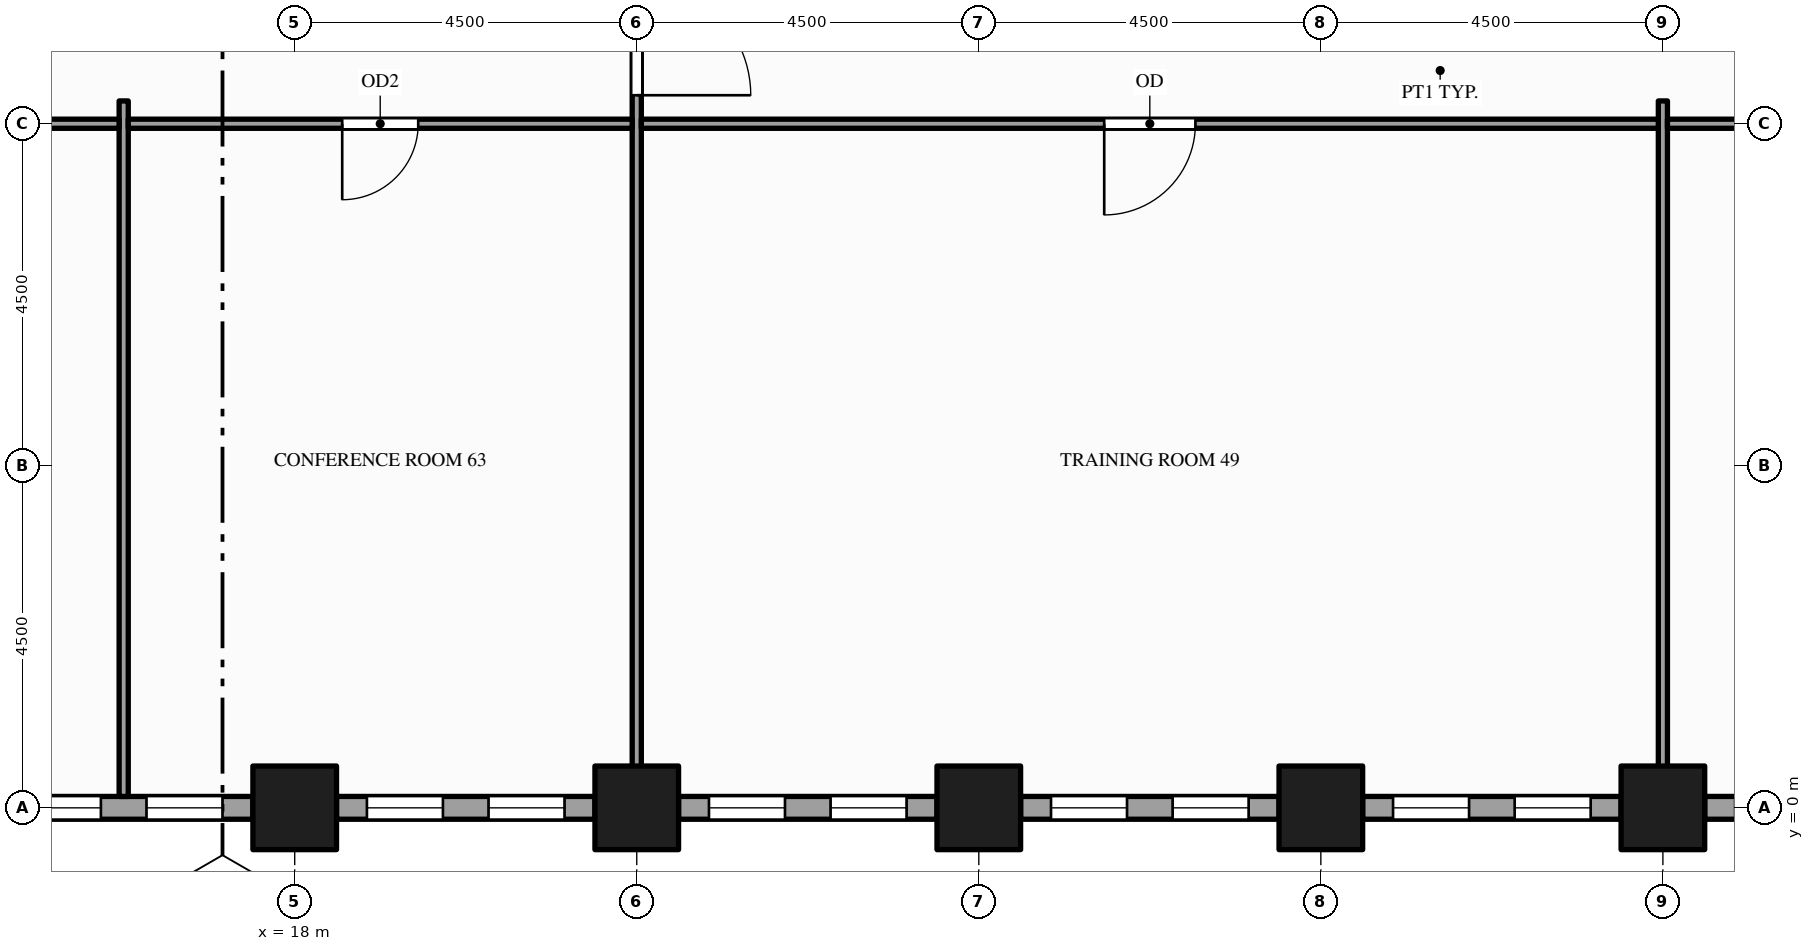
"""IFC4 building model, lengths in metres.
Left out: names, types, materials, properties, quantities, classifications, styles, units other than length and angle.
Written with IfcOpenShell. Run it as: python <this file> out.ifc"""

import sys

from ifc_helpers import new_model, si_unit, direction, frame, frame_2d, origin, origin_2d, place, context, subcontext, project, spatial, rectangle, hollow_rectangle, extrude, element, fill, save


model = new_model("IFC4")
c1 = context("Model", 3, precision=1e-05, world=origin(), true_north=direction((0.0, 1.0)))
c2 = subcontext(c1, "Body", "Model", "MODEL_VIEW")
j1 = project(units=[si_unit("LENGTHUNIT", "METRE"), si_unit("PLANEANGLEUNIT", "RADIAN")], contexts=[c1])
p1 = place(None, origin())
s1 = spatial("IfcSite", under=j1, at=p1, CompositionType="ELEMENT")
p2 = place(p1, origin())
s2 = spatial("IfcBuilding", under=s1, at=p2, CompositionType="ELEMENT")
p3 = place(p2, frame((0.0, 0.0, 19.0)))
s3 = spatial("IfcBuildingStorey", under=s2, at=p3, CompositionType="ELEMENT", Elevation=19.0)
for number, where, z_axis, x_axis in (
    (1, (18.0, 0.0, -0.25), (0.0, 0.0, 1.0), (1.0, 0.0, 0.0)),
    (2, (22.5, 0.0, -0.25), (0.0, 0.0, 1.0), (1.0, 0.0, 0.0)),
    (3, (27.0, 0.0, -0.25), (0.0, 0.0, 1.0), (1.0, 0.0, 0.0)),
    (4, (31.5, 0.0, -0.25), (0.0, 0.0, 1.0), (1.0, 0.0, 0.0)),
    (5, (36.0, 0.0, -0.25), (0.0, 0.0, 1.0), (1.0, 0.0, 0.0)),
):
    element("IfcColumn", number, at=place(p3, frame(where, z_axis=z_axis, x_axis=x_axis)), inside=s3, PredefinedType="COLUMN", context=c2, shape_type="SweptSolid", body=[
        extrude(hollow_rectangle(XDim=1.1, YDim=1.1, WallThickness=0.06, at=origin_2d()), origin(), (0.0, 0.0, 1.0), 5.0),
    ])
p4 = place(p3, frame((14.05, 0.0, 0.0), z_axis=(0.0, 0.0, 1.0), x_axis=(1.0, 0.0, 0.0)))
e6 = element("IfcWall", 6, at=p4, inside=s3, PredefinedType="STANDARD", context=c2, shape_type="SweptSolid", body=[
    extrude(rectangle(XDim=3.4, YDim=0.3, at=frame_2d((1.7, 0.0))), origin(), (0.0, 0.0, 1.0), 4.036),
])
p5 = place(p4, frame((0.4, 0.0, 0.9)))
e7 = element("IfcOpeningElement", 7, at=p5, cuts=e6, PredefinedType="OPENING", context=c2, shape_type="SweptSolid", body=[
    extrude(rectangle(XDim=1.0, YDim=2.75, at=frame_2d((0.5, 1.375))), frame((0.0, 0.16, 0.0), z_axis=(0.0, -1.0, 0.0), x_axis=(1.0, 0.0, 0.0)), (0.0, 0.0, 1.0), 0.32),
])
p6 = place(p4, frame((2.0, 0.0, 0.9)))
e8 = element("IfcOpeningElement", 8, at=p6, cuts=e6, PredefinedType="OPENING", context=c2, shape_type="SweptSolid", body=[
    extrude(rectangle(XDim=1.0, YDim=2.75, at=frame_2d((0.5, 1.375))), frame((0.0, 0.16, 0.0), z_axis=(0.0, -1.0, 0.0), x_axis=(1.0, 0.0, 0.0)), (0.0, 0.0, 1.0), 0.32),
])
p7 = place(p3, frame((18.55, 0.0, 0.0), z_axis=(0.0, 0.0, 1.0), x_axis=(1.0, 0.0, 0.0)))
e9 = element("IfcWall", 9, at=p7, inside=s3, PredefinedType="STANDARD", context=c2, shape_type="SweptSolid", body=[
    extrude(rectangle(XDim=3.4, YDim=0.3, at=frame_2d((1.7, 0.0))), origin(), (0.0, 0.0, 1.0), 4.036),
])
p8 = place(p7, frame((0.4, 0.0, 0.9)))
e10 = element("IfcOpeningElement", 10, at=p8, cuts=e9, PredefinedType="OPENING", context=c2, shape_type="SweptSolid", body=[
    extrude(rectangle(XDim=1.0, YDim=2.75, at=frame_2d((0.5, 1.375))), frame((0.0, 0.16, 0.0), z_axis=(0.0, -1.0, 0.0), x_axis=(1.0, 0.0, 0.0)), (0.0, 0.0, 1.0), 0.32),
])
p9 = place(p7, frame((2.0, 0.0, 0.9)))
e11 = element("IfcOpeningElement", 11, at=p9, cuts=e9, PredefinedType="OPENING", context=c2, shape_type="SweptSolid", body=[
    extrude(rectangle(XDim=1.0, YDim=2.75, at=frame_2d((0.5, 1.375))), frame((0.0, 0.16, 0.0), z_axis=(0.0, -1.0, 0.0), x_axis=(1.0, 0.0, 0.0)), (0.0, 0.0, 1.0), 0.32),
])
p10 = place(p3, frame((23.05, 0.0, 0.0), z_axis=(0.0, 0.0, 1.0), x_axis=(1.0, 0.0, 0.0)))
e12 = element("IfcWall", 12, at=p10, inside=s3, PredefinedType="STANDARD", context=c2, shape_type="SweptSolid", body=[
    extrude(rectangle(XDim=3.4, YDim=0.3, at=frame_2d((1.7, 0.0))), origin(), (0.0, 0.0, 1.0), 4.036),
])
p11 = place(p10, frame((0.4, 0.0, 0.9)))
e13 = element("IfcOpeningElement", 13, at=p11, cuts=e12, PredefinedType="OPENING", context=c2, shape_type="SweptSolid", body=[
    extrude(rectangle(XDim=1.0, YDim=2.75, at=frame_2d((0.5, 1.375))), frame((0.0, 0.16, 0.0), z_axis=(0.0, -1.0, 0.0), x_axis=(1.0, 0.0, 0.0)), (0.0, 0.0, 1.0), 0.32),
])
p12 = place(p10, frame((2.0, 0.0, 0.9)))
e14 = element("IfcOpeningElement", 14, at=p12, cuts=e12, PredefinedType="OPENING", context=c2, shape_type="SweptSolid", body=[
    extrude(rectangle(XDim=1.0, YDim=2.75, at=frame_2d((0.5, 1.375))), frame((0.0, 0.16, 0.0), z_axis=(0.0, -1.0, 0.0), x_axis=(1.0, 0.0, 0.0)), (0.0, 0.0, 1.0), 0.32),
])
p13 = place(p3, frame((27.55, 0.0, 0.0), z_axis=(0.0, 0.0, 1.0), x_axis=(1.0, 0.0, 0.0)))
e15 = element("IfcWall", 15, at=p13, inside=s3, PredefinedType="STANDARD", context=c2, shape_type="SweptSolid", body=[
    extrude(rectangle(XDim=3.4, YDim=0.3, at=frame_2d((1.7, 0.0))), origin(), (0.0, 0.0, 1.0), 4.036),
])
p14 = place(p13, frame((0.4, 0.0, 0.9)))
e16 = element("IfcOpeningElement", 16, at=p14, cuts=e15, PredefinedType="OPENING", context=c2, shape_type="SweptSolid", body=[
    extrude(rectangle(XDim=1.0, YDim=2.75, at=frame_2d((0.5, 1.375))), frame((0.0, 0.16, 0.0), z_axis=(0.0, -1.0, 0.0), x_axis=(1.0, 0.0, 0.0)), (0.0, 0.0, 1.0), 0.32),
])
p15 = place(p13, frame((2.0, 0.0, 0.9)))
e17 = element("IfcOpeningElement", 17, at=p15, cuts=e15, PredefinedType="OPENING", context=c2, shape_type="SweptSolid", body=[
    extrude(rectangle(XDim=1.0, YDim=2.75, at=frame_2d((0.5, 1.375))), frame((0.0, 0.16, 0.0), z_axis=(0.0, -1.0, 0.0), x_axis=(1.0, 0.0, 0.0)), (0.0, 0.0, 1.0), 0.32),
])
p16 = place(p3, frame((32.05, 0.0, 0.0), z_axis=(0.0, 0.0, 1.0), x_axis=(1.0, 0.0, 0.0)))
e18 = element("IfcWall", 18, at=p16, inside=s3, PredefinedType="STANDARD", context=c2, shape_type="SweptSolid", body=[
    extrude(rectangle(XDim=3.4, YDim=0.3, at=frame_2d((1.7, 0.0))), origin(), (0.0, 0.0, 1.0), 4.036),
])
p17 = place(p16, frame((0.4, 0.0, 0.9)))
e19 = element("IfcOpeningElement", 19, at=p17, cuts=e18, PredefinedType="OPENING", context=c2, shape_type="SweptSolid", body=[
    extrude(rectangle(XDim=1.0, YDim=2.75, at=frame_2d((0.5, 1.375))), frame((0.0, 0.16, 0.0), z_axis=(0.0, -1.0, 0.0), x_axis=(1.0, 0.0, 0.0)), (0.0, 0.0, 1.0), 0.32),
])
p18 = place(p16, frame((2.0, 0.0, 0.9)))
e20 = element("IfcOpeningElement", 20, at=p18, cuts=e18, PredefinedType="OPENING", context=c2, shape_type="SweptSolid", body=[
    extrude(rectangle(XDim=1.0, YDim=2.75, at=frame_2d((0.5, 1.375))), frame((0.0, 0.16, 0.0), z_axis=(0.0, -1.0, 0.0), x_axis=(1.0, 0.0, 0.0)), (0.0, 0.0, 1.0), 0.32),
])
p19 = place(p3, frame((36.55, 0.0, 0.0), z_axis=(0.0, 0.0, 1.0), x_axis=(1.0, 0.0, 0.0)))
e21 = element("IfcWall", 21, at=p19, inside=s3, PredefinedType="STANDARD", context=c2, shape_type="SweptSolid", body=[
    extrude(rectangle(XDim=3.4, YDim=0.3, at=frame_2d((1.7, 0.0))), origin(), (0.0, 0.0, 1.0), 4.036),
])
p20 = place(p19, frame((0.4, 0.0, 0.9)))
e22 = element("IfcOpeningElement", 22, at=p20, cuts=e21, PredefinedType="OPENING", context=c2, shape_type="SweptSolid", body=[
    extrude(rectangle(XDim=1.0, YDim=2.75, at=frame_2d((0.5, 1.375))), frame((0.0, 0.16, 0.0), z_axis=(0.0, -1.0, 0.0), x_axis=(1.0, 0.0, 0.0)), (0.0, 0.0, 1.0), 0.32),
])
p21 = place(p19, frame((2.0, 0.0, 0.9)))
e23 = element("IfcOpeningElement", 23, at=p21, cuts=e21, PredefinedType="OPENING", context=c2, shape_type="SweptSolid", body=[
    extrude(rectangle(XDim=1.0, YDim=2.75, at=frame_2d((0.5, 1.375))), frame((0.0, 0.16, 0.0), z_axis=(0.0, -1.0, 0.0), x_axis=(1.0, 0.0, 0.0)), (0.0, 0.0, 1.0), 0.32),
])
p22 = place(p3, frame((15.75, 0.15, 0.0), z_axis=(0.0, 0.0, 1.0), x_axis=(0.0, 1.0, 0.0)))
e24 = element("IfcWall", 24, at=p22, inside=s3, PredefinedType="PARTITIONING", context=c2, shape_type="SweptSolid", body=[
    extrude(rectangle(XDim=9.15, YDim=0.12, at=frame_2d((4.575, 0.0))), origin(), (0.0, 0.0, 1.0), 3.759),
])
p23 = place(p3, frame((22.5, 0.15, 0.0), z_axis=(0.0, 0.0, 1.0), x_axis=(0.0, 1.0, 0.0)))
e25 = element("IfcWall", 25, at=p23, inside=s3, PredefinedType="PARTITIONING", context=c2, shape_type="SweptSolid", body=[
    extrude(rectangle(XDim=35.95, YDim=0.12, at=frame_2d((17.975, 0.0))), origin(), (0.0, 0.0, 1.0), 3.759),
])
p24 = place(p23, frame((9.225, 0.0, 0.0)))
e26 = element("IfcOpeningElement", 26, at=p24, cuts=e25, PredefinedType="OPENING", context=c2, shape_type="SweptSolid", body=[
    extrude(rectangle(XDim=1.5, YDim=2.1, at=frame_2d((0.75, 1.05))), frame((0.0, 0.07, 0.0), z_axis=(0.0, -1.0, 0.0), x_axis=(1.0, 0.0, 0.0)), (0.0, 0.0, 1.0), 0.14),
])
p25 = place(p23, frame((32.7, 0.0, 0.0)))
e27 = element("IfcOpeningElement", 27, at=p25, cuts=e25, PredefinedType="OPENING", context=c2, shape_type="SweptSolid", body=[
    extrude(rectangle(XDim=1.8, YDim=2.1, at=frame_2d((0.9, 1.05))), frame((0.0, 0.07, 0.0), z_axis=(0.0, -1.0, 0.0), x_axis=(1.0, 0.0, 0.0)), (0.0, 0.0, 1.0), 0.14),
])
p26 = place(p3, frame((36.0, 0.15, 0.0), z_axis=(0.0, 0.0, 1.0), x_axis=(0.0, 1.0, 0.0)))
e28 = element("IfcWall", 28, at=p26, inside=s3, PredefinedType="PARTITIONING", context=c2, shape_type="SweptSolid", body=[
    extrude(rectangle(XDim=9.15, YDim=0.12, at=frame_2d((4.575, 0.0))), origin(), (0.0, 0.0, 1.0), 3.759),
])
p27 = place(p3, frame((9.06, 9.0, 0.0), z_axis=(0.0, 0.0, 1.0), x_axis=(1.0, 0.0, 0.0)))
e29 = element("IfcWall", 29, at=p27, inside=s3, PredefinedType="PARTITIONING", context=c2, shape_type="SweptSolid", body=[
    extrude(rectangle(XDim=6.63, YDim=0.12, at=frame_2d((3.315, 0.0))), origin(), (0.0, 0.0, 1.0), 3.759),
])
p28 = place(p27, frame((2.815, 0.0, 0.0)))
e30 = element("IfcOpeningElement", 30, at=p28, cuts=e29, PredefinedType="OPENING", context=c2, shape_type="SweptSolid", body=[
    extrude(rectangle(XDim=1.0, YDim=2.1, at=frame_2d((0.5, 1.05))), frame((0.0, 0.07, 0.0), z_axis=(0.0, -1.0, 0.0), x_axis=(1.0, 0.0, 0.0)), (0.0, 0.0, 1.0), 0.14),
])
p29 = place(p3, frame((15.81, 9.0, 0.0), z_axis=(0.0, 0.0, 1.0), x_axis=(1.0, 0.0, 0.0)))
e31 = element("IfcWall", 31, at=p29, inside=s3, PredefinedType="PARTITIONING", context=c2, shape_type="SweptSolid", body=[
    extrude(rectangle(XDim=6.63, YDim=0.12, at=frame_2d((3.315, 0.0))), origin(), (0.0, 0.0, 1.0), 3.759),
])
p30 = place(p29, frame((2.815, 0.0, 0.0)))
e32 = element("IfcOpeningElement", 32, at=p30, cuts=e31, PredefinedType="OPENING", context=c2, shape_type="SweptSolid", body=[
    extrude(rectangle(XDim=1.0, YDim=2.1, at=frame_2d((0.5, 1.05))), frame((0.0, 0.07, 0.0), z_axis=(0.0, -1.0, 0.0), x_axis=(1.0, 0.0, 0.0)), (0.0, 0.0, 1.0), 0.14),
])
p31 = place(p3, frame((22.56, 9.0, 0.0), z_axis=(0.0, 0.0, 1.0), x_axis=(1.0, 0.0, 0.0)))
e33 = element("IfcWall", 33, at=p31, inside=s3, PredefinedType="PARTITIONING", context=c2, shape_type="SweptSolid", body=[
    extrude(rectangle(XDim=13.38, YDim=0.12, at=frame_2d((6.69, 0.0))), origin(), (0.0, 0.0, 1.0), 3.66),
])
p32 = place(p31, frame((6.09, 0.0, 0.0)))
e34 = element("IfcOpeningElement", 34, at=p32, cuts=e33, PredefinedType="OPENING", context=c2, shape_type="SweptSolid", body=[
    extrude(rectangle(XDim=1.2, YDim=2.1, at=frame_2d((0.6, 1.05))), frame((0.0, 0.07, 0.0), z_axis=(0.0, -1.0, 0.0), x_axis=(1.0, 0.0, 0.0)), (0.0, 0.0, 1.0), 0.14),
])
p33 = place(p3, frame((36.06, 9.0, 0.0), z_axis=(0.0, 0.0, 1.0), x_axis=(1.0, 0.0, 0.0)))
e35 = element("IfcWall", 35, at=p33, inside=s3, PredefinedType="PARTITIONING", context=c2, shape_type="SweptSolid", body=[
    extrude(rectangle(XDim=8.88, YDim=0.12, at=frame_2d((4.44, 0.0))), origin(), (0.0, 0.0, 1.0), 3.66),
])
p34 = place(p33, frame((3.84, 0.0, 0.0)))
e36 = element("IfcOpeningElement", 36, at=p34, cuts=e35, PredefinedType="OPENING", context=c2, shape_type="SweptSolid", body=[
    extrude(rectangle(XDim=1.2, YDim=2.1, at=frame_2d((0.6, 1.05))), frame((0.0, 0.07, 0.0), z_axis=(0.0, -1.0, 0.0), x_axis=(1.0, 0.0, 0.0)), (0.0, 0.0, 1.0), 0.14),
])
p35 = place(p5, origin())
e37 = element("IfcWindow", 37, at=p35, inside=s3, PartitioningType="SINGLE_PANEL", PredefinedType="WINDOW", context=c2, shape_type="SweptSolid", body=[
    extrude(rectangle(XDim=1.0, YDim=2.75, at=frame_2d((0.5, 1.375))), frame((0.0, 0.03, 0.0), z_axis=(0.0, -1.0, 0.0), x_axis=(1.0, 0.0, 0.0)), (0.0, 0.0, 1.0), 0.06),
])
fill(e7, e37)
p36 = place(p6, origin())
e38 = element("IfcWindow", 38, at=p36, inside=s3, PartitioningType="SINGLE_PANEL", PredefinedType="WINDOW", context=c2, shape_type="SweptSolid", body=[
    extrude(rectangle(XDim=1.0, YDim=2.75, at=frame_2d((0.5, 1.375))), frame((0.0, 0.03, 0.0), z_axis=(0.0, -1.0, 0.0), x_axis=(1.0, 0.0, 0.0)), (0.0, 0.0, 1.0), 0.06),
])
fill(e8, e38)
p37 = place(p8, origin())
e39 = element("IfcWindow", 39, at=p37, inside=s3, PartitioningType="SINGLE_PANEL", PredefinedType="WINDOW", context=c2, shape_type="SweptSolid", body=[
    extrude(rectangle(XDim=1.0, YDim=2.75, at=frame_2d((0.5, 1.375))), frame((0.0, 0.03, 0.0), z_axis=(0.0, -1.0, 0.0), x_axis=(1.0, 0.0, 0.0)), (0.0, 0.0, 1.0), 0.06),
])
fill(e10, e39)
p38 = place(p9, origin())
e40 = element("IfcWindow", 40, at=p38, inside=s3, PartitioningType="SINGLE_PANEL", PredefinedType="WINDOW", context=c2, shape_type="SweptSolid", body=[
    extrude(rectangle(XDim=1.0, YDim=2.75, at=frame_2d((0.5, 1.375))), frame((0.0, 0.03, 0.0), z_axis=(0.0, -1.0, 0.0), x_axis=(1.0, 0.0, 0.0)), (0.0, 0.0, 1.0), 0.06),
])
fill(e11, e40)
p39 = place(p11, origin())
e41 = element("IfcWindow", 41, at=p39, inside=s3, PartitioningType="SINGLE_PANEL", PredefinedType="WINDOW", context=c2, shape_type="SweptSolid", body=[
    extrude(rectangle(XDim=1.0, YDim=2.75, at=frame_2d((0.5, 1.375))), frame((0.0, 0.03, 0.0), z_axis=(0.0, -1.0, 0.0), x_axis=(1.0, 0.0, 0.0)), (0.0, 0.0, 1.0), 0.06),
])
fill(e13, e41)
p40 = place(p12, origin())
e42 = element("IfcWindow", 42, at=p40, inside=s3, PartitioningType="SINGLE_PANEL", PredefinedType="WINDOW", context=c2, shape_type="SweptSolid", body=[
    extrude(rectangle(XDim=1.0, YDim=2.75, at=frame_2d((0.5, 1.375))), frame((0.0, 0.03, 0.0), z_axis=(0.0, -1.0, 0.0), x_axis=(1.0, 0.0, 0.0)), (0.0, 0.0, 1.0), 0.06),
])
fill(e14, e42)
p41 = place(p14, origin())
e43 = element("IfcWindow", 43, at=p41, inside=s3, PartitioningType="SINGLE_PANEL", PredefinedType="WINDOW", context=c2, shape_type="SweptSolid", body=[
    extrude(rectangle(XDim=1.0, YDim=2.75, at=frame_2d((0.5, 1.375))), frame((0.0, 0.03, 0.0), z_axis=(0.0, -1.0, 0.0), x_axis=(1.0, 0.0, 0.0)), (0.0, 0.0, 1.0), 0.06),
])
fill(e16, e43)
p42 = place(p15, origin())
e44 = element("IfcWindow", 44, at=p42, inside=s3, PartitioningType="SINGLE_PANEL", PredefinedType="WINDOW", context=c2, shape_type="SweptSolid", body=[
    extrude(rectangle(XDim=1.0, YDim=2.75, at=frame_2d((0.5, 1.375))), frame((0.0, 0.03, 0.0), z_axis=(0.0, -1.0, 0.0), x_axis=(1.0, 0.0, 0.0)), (0.0, 0.0, 1.0), 0.06),
])
fill(e17, e44)
p43 = place(p17, origin())
e45 = element("IfcWindow", 45, at=p43, inside=s3, PartitioningType="SINGLE_PANEL", PredefinedType="WINDOW", context=c2, shape_type="SweptSolid", body=[
    extrude(rectangle(XDim=1.0, YDim=2.75, at=frame_2d((0.5, 1.375))), frame((0.0, 0.03, 0.0), z_axis=(0.0, -1.0, 0.0), x_axis=(1.0, 0.0, 0.0)), (0.0, 0.0, 1.0), 0.06),
])
fill(e19, e45)
p44 = place(p18, origin())
e46 = element("IfcWindow", 46, at=p44, inside=s3, PartitioningType="SINGLE_PANEL", PredefinedType="WINDOW", context=c2, shape_type="SweptSolid", body=[
    extrude(rectangle(XDim=1.0, YDim=2.75, at=frame_2d((0.5, 1.375))), frame((0.0, 0.03, 0.0), z_axis=(0.0, -1.0, 0.0), x_axis=(1.0, 0.0, 0.0)), (0.0, 0.0, 1.0), 0.06),
])
fill(e20, e46)
p45 = place(p32, origin())
e47 = element("IfcDoor", 47, at=p45, inside=s3, OperationType="SINGLE_SWING_LEFT", PredefinedType="DOOR", context=c2, shape_type="SweptSolid", body=[
    extrude(rectangle(XDim=1.2, YDim=2.1, at=frame_2d((0.6, 1.05))), frame((0.0, 0.025, 0.0), z_axis=(0.0, -1.0, 0.0), x_axis=(1.0, 0.0, 0.0)), (0.0, 0.0, 1.0), 0.05),
])
fill(e34, e47)
p46 = place(p24, origin())
e48 = element("IfcDoor", 48, at=p46, inside=s3, OperationType="SINGLE_SWING_LEFT", PredefinedType="DOOR", context=c2, shape_type="SweptSolid", body=[
    extrude(rectangle(XDim=1.5, YDim=2.1, at=frame_2d((0.75, 1.05))), frame((0.0, 0.025, 0.0), z_axis=(0.0, -1.0, 0.0), x_axis=(1.0, 0.0, 0.0)), (0.0, 0.0, 1.0), 0.05),
])
fill(e26, e48)
p47 = place(p30, origin())
e49 = element("IfcDoor", 49, at=p47, inside=s3, OperationType="SINGLE_SWING_LEFT", PredefinedType="DOOR", context=c2, shape_type="SweptSolid", body=[
    extrude(rectangle(XDim=1.0, YDim=2.1, at=frame_2d((0.5, 1.05))), frame((0.0, 0.025, 0.0), z_axis=(0.0, -1.0, 0.0), x_axis=(1.0, 0.0, 0.0)), (0.0, 0.0, 1.0), 0.05),
])
fill(e32, e49)
save(model, sys.argv[1])
